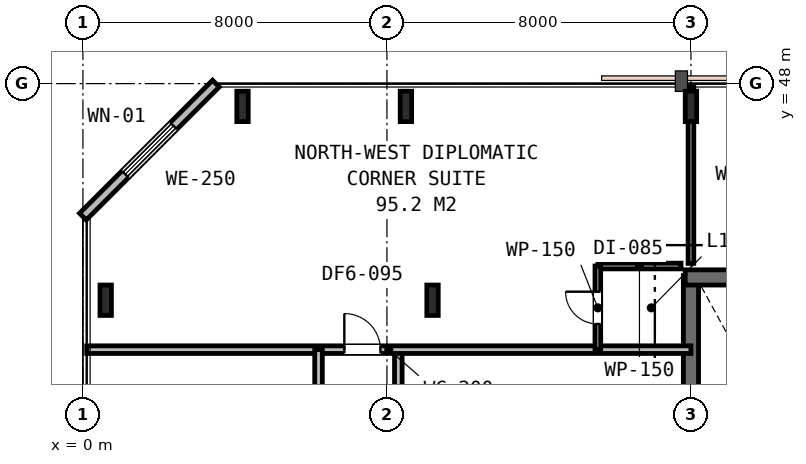
"""IFC4 building model, lengths in metres.
Left out: names, types, materials, properties, quantities, classifications, styles, units other than length and angle.
Written with IfcOpenShell. Run it as: python <this file> out.ifc"""

import sys

from ifc_helpers import new_model, si_unit, direction, frame, frame_2d, origin, origin_2d, place, context, subcontext, project, spatial, rectangle, i_section, extrude, element, fill, save


model = new_model("IFC4")
c1 = context("Model", 3, precision=1e-05, world=origin(), true_north=direction((0.0, 1.0)))
c2 = subcontext(c1, "Body", "Model", "MODEL_VIEW")
j1 = project(units=[si_unit("LENGTHUNIT", "METRE"), si_unit("PLANEANGLEUNIT", "RADIAN")], contexts=[c1])
p1 = place(None, origin())
s1 = spatial("IfcSite", under=j1, at=p1, CompositionType="ELEMENT")
p2 = place(p1, origin())
s2 = spatial("IfcBuilding", under=s1, at=p2, CompositionType="ELEMENT")
p3 = place(p2, frame((0.0, 0.0, 76.2)))
s3 = spatial("IfcBuildingStorey", under=s2, at=p3, CompositionType="ELEMENT", Elevation=76.2)
p4 = place(p3, frame((16.0, 30.65, 0.0), z_axis=(0.0, 0.0, 1.0), x_axis=(0.0, 1.0, 0.0)))
e1 = element("IfcWall", 1, at=p4, inside=s3, PredefinedType="SHEAR", context=c2, shape_type="SweptSolid", body=[
    extrude(rectangle(XDim=12.3, YDim=0.4, at=frame_2d((6.15, 0.0))), origin(), (0.0, 0.0, 1.0), 3.6),
])
p5 = place(p3, frame((15.85, 42.9, 0.0), z_axis=(0.0, 0.0, 1.0), x_axis=(1.0, 0.0, 0.0)))
e2 = element("IfcWall", 2, at=p5, inside=s3, PredefinedType="SHEAR", context=c2, shape_type="SweptSolid", body=[
    extrude(rectangle(XDim=24.3, YDim=0.4, at=frame_2d((12.15, 0.0))), origin(), (0.0, 0.0, 1.0), 3.6),
])
for number, where, z_axis, x_axis in (
    (3, (9.2, 42.3, 0.0), (0.0, 0.0, 1.0), (1.0, 0.0, 0.0)),
    (4, (0.6, 42.3, 0.0), (0.0, 0.0, 1.0), (1.0, 0.0, 0.0)),
    (5, (4.2, 47.4, 0.0), (0.0, 0.0, 1.0), (1.0, 0.0, 0.0)),
    (6, (8.5, 47.4, 0.0), (0.0, 0.0, 1.0), (1.0, 0.0, 0.0)),
    (7, (16.0, 47.4, 0.0), (0.0, 0.0, 1.0), (1.0, 0.0, 0.0)),
):
    element("IfcColumn", number, at=place(p3, frame(where, z_axis=z_axis, x_axis=x_axis)), inside=s3, PredefinedType="COLUMN", context=c2, shape_type="SweptSolid", body=[
        extrude(i_section(OverallWidth=0.3, OverallDepth=0.8, WebThickness=0.018, FlangeThickness=0.033, FilletRadius=0.03, at=origin_2d()), origin(), (0.0, 0.0, 1.0), 3.6),
    ])
p6 = place(p3, frame((3.5, 48.0, 0.0), z_axis=(0.0, 0.0, 1.0), x_axis=(-0.707106781187, -0.707106781187, 0.0)))
e8 = element("IfcWall", 8, at=p6, inside=s3, PredefinedType="STANDARD", context=c2, shape_type="SweptSolid", body=[
    extrude(rectangle(XDim=4.95, YDim=0.25, at=frame_2d((2.475, 0.0))), origin(), (0.0, 0.0, 1.0), 3.24),
])
p7 = place(p6, frame((1.575, 0.0, 0.75)))
e9 = element("IfcOpeningElement", 9, at=p7, cuts=e8, PredefinedType="OPENING", context=c2, shape_type="SweptSolid", body=[
    extrude(rectangle(XDim=1.8, YDim=1.85, at=frame_2d((0.9, 0.925))), frame((0.0, 0.135, 0.0), z_axis=(0.0, -1.0, 0.0), x_axis=(1.0, 0.0, 0.0)), (0.0, 0.0, 1.0), 0.27),
])
p8 = place(p3, frame((8.3, 30.8, 0.0), z_axis=(0.0, 0.0, 1.0), x_axis=(0.0, 1.0, 0.0)))
e10 = element("IfcWall", 10, at=p8, inside=s3, PredefinedType="PARTITIONING", context=c2, shape_type="SweptSolid", body=[
    extrude(rectangle(XDim=10.2, YDim=0.2, at=frame_2d((5.1, 0.0))), origin(), (0.0, 0.0, 1.0), 2.74),
])
p9 = place(p8, frame((1.95, 0.0, 0.0)))
e11 = element("IfcOpeningElement", 11, at=p9, cuts=e10, PredefinedType="OPENING", context=c2, shape_type="SweptSolid", body=[
    extrude(rectangle(XDim=0.9, YDim=2.15, at=frame_2d((0.45, 1.075))), frame((0.0, 0.11, 0.0), z_axis=(0.0, -1.0, 0.0), x_axis=(1.0, 0.0, 0.0)), (0.0, 0.0, 1.0), 0.22),
])
p10 = place(p8, frame((7.025, 0.0, 0.0)))
e12 = element("IfcOpeningElement", 12, at=p10, cuts=e10, PredefinedType="OPENING", context=c2, shape_type="SweptSolid", body=[
    extrude(rectangle(XDim=0.95, YDim=2.15, at=frame_2d((0.475, 1.075))), frame((0.0, 0.11, 0.0), z_axis=(0.0, -1.0, 0.0), x_axis=(1.0, 0.0, 0.0)), (0.0, 0.0, 1.0), 0.22),
])
p11 = place(p3, frame((0.1, 41.0, 0.0), z_axis=(0.0, 0.0, 1.0), x_axis=(1.0, 0.0, 0.0)))
e13 = element("IfcWall", 13, at=p11, inside=s3, PredefinedType="PARTITIONING", context=c2, shape_type="SweptSolid", body=[
    extrude(rectangle(XDim=15.9, YDim=0.2, at=frame_2d((7.95, 0.0))), origin(), (0.0, 0.0, 1.0), 2.74),
])
p12 = place(p11, frame((6.779, 0.0, 0.0)))
e14 = element("IfcOpeningElement", 14, at=p12, cuts=e13, PredefinedType="OPENING", context=c2, shape_type="SweptSolid", body=[
    extrude(rectangle(XDim=0.95, YDim=2.15, at=frame_2d((0.475, 1.075))), frame((0.0, 0.11, 0.0), z_axis=(0.0, -1.0, 0.0), x_axis=(1.0, 0.0, 0.0)), (0.0, 0.0, 1.0), 0.22),
])
p13 = place(p3, frame((13.55, 43.2, 0.0), z_axis=(0.0, 0.0, 1.0), x_axis=(1.0, 0.0, 0.0)))
e15 = element("IfcWall", 15, at=p13, inside=s3, PredefinedType="PARTITIONING", context=c2, shape_type="SweptSolid", body=[
    extrude(rectangle(XDim=2.19, YDim=0.15, at=frame_2d((1.095, 0.0))), origin(), (0.0, 0.0, 1.0), 3.24),
])
p14 = place(p3, frame((13.55, 41.0, 0.0), z_axis=(0.0, 0.0, 1.0), x_axis=(0.0, 1.0, 0.0)))
e16 = element("IfcWall", 16, at=p14, inside=s3, PredefinedType="PARTITIONING", context=c2, shape_type="SweptSolid", body=[
    extrude(rectangle(XDim=2.2, YDim=0.15, at=frame_2d((1.1, 0.0))), origin(), (0.0, 0.0, 1.0), 3.24),
])
p15 = place(p14, frame((0.675, 0.0, 0.0)))
e17 = element("IfcOpeningElement", 17, at=p15, cuts=e16, PredefinedType="OPENING", context=c2, shape_type="SweptSolid", body=[
    extrude(rectangle(XDim=0.85, YDim=2.15, at=frame_2d((0.425, 1.075))), frame((0.0, 0.085, 0.0), z_axis=(0.0, -1.0, 0.0), x_axis=(1.0, 0.0, 0.0)), (0.0, 0.0, 1.0), 0.17),
])
p16 = place(p3, frame((6.2, 28.6, 0.0), z_axis=(0.0, 0.0, 1.0), x_axis=(0.0, 1.0, 0.0)))
e18 = element("IfcWall", 18, at=p16, inside=s3, PredefinedType="PARTITIONING", context=c2, shape_type="SweptSolid", body=[
    extrude(rectangle(XDim=12.4, YDim=0.2, at=frame_2d((6.2, 0.0))), origin(), (0.0, 0.0, 1.0), 2.74),
])
p17 = place(p16, frame((3.725, 0.0, 0.0)))
e19 = element("IfcOpeningElement", 19, at=p17, cuts=e18, PredefinedType="OPENING", context=c2, shape_type="SweptSolid", body=[
    extrude(rectangle(XDim=0.95, YDim=2.15, at=frame_2d((0.475, 1.075))), frame((0.0, 0.11, 0.0), z_axis=(0.0, -1.0, 0.0), x_axis=(1.0, 0.0, 0.0)), (0.0, 0.0, 1.0), 0.22),
])
p18 = place(p16, frame((8.381, 0.0, 0.0)))
e20 = element("IfcOpeningElement", 20, at=p18, cuts=e18, PredefinedType="OPENING", context=c2, shape_type="SweptSolid", body=[
    extrude(rectangle(XDim=0.95, YDim=2.15, at=frame_2d((0.475, 1.075))), frame((0.0, 0.11, 0.0), z_axis=(0.0, -1.0, 0.0), x_axis=(1.0, 0.0, 0.0)), (0.0, 0.0, 1.0), 0.22),
])
p19 = place(p3, frame((16.0, 43.27, 0.0), z_axis=(0.0, 0.0, 1.0), x_axis=(0.0, 1.0, 0.0)))
e21 = element("IfcWall", 21, at=p19, inside=s3, PredefinedType="PARTITIONING", context=c2, shape_type="SweptSolid", body=[
    extrude(rectangle(XDim=4.63, YDim=0.15, at=frame_2d((2.315, 0.0))), origin(), (0.0, 0.0, 1.0), 2.83),
])
p20 = place(p7, origin())
e22 = element("IfcWindow", 22, at=p20, inside=s3, PartitioningType="SINGLE_PANEL", PredefinedType="WINDOW", context=c2, shape_type="SweptSolid", body=[
    extrude(rectangle(XDim=1.8, YDim=1.85, at=frame_2d((0.9, 0.925))), frame((0.0, 0.03, 0.0), z_axis=(0.0, -1.0, 0.0), x_axis=(1.0, 0.0, 0.0)), (0.0, 0.0, 1.0), 0.06),
])
fill(e9, e22)
p21 = place(p12, origin())
e23 = element("IfcDoor", 23, at=p21, inside=s3, OperationType="SINGLE_SWING_LEFT", PredefinedType="DOOR", context=c2, shape_type="SweptSolid", body=[
    extrude(rectangle(XDim=0.95, YDim=2.15, at=frame_2d((0.475, 1.075))), frame((0.0, 0.025, 0.0), z_axis=(0.0, -1.0, 0.0), x_axis=(1.0, 0.0, 0.0)), (0.0, 0.0, 1.0), 0.05),
])
fill(e14, e23)
p22 = place(p15, origin())
e24 = element("IfcDoor", 24, at=p22, inside=s3, OperationType="SINGLE_SWING_RIGHT", PredefinedType="DOOR", context=c2, shape_type="SweptSolid", body=[
    extrude(rectangle(XDim=0.85, YDim=2.15, at=frame_2d((0.425, 1.075))), frame((0.0, 0.025, 0.0), z_axis=(0.0, -1.0, 0.0), x_axis=(1.0, 0.0, 0.0)), (0.0, 0.0, 1.0), 0.05),
])
fill(e17, e24)
save(model, sys.argv[1])
